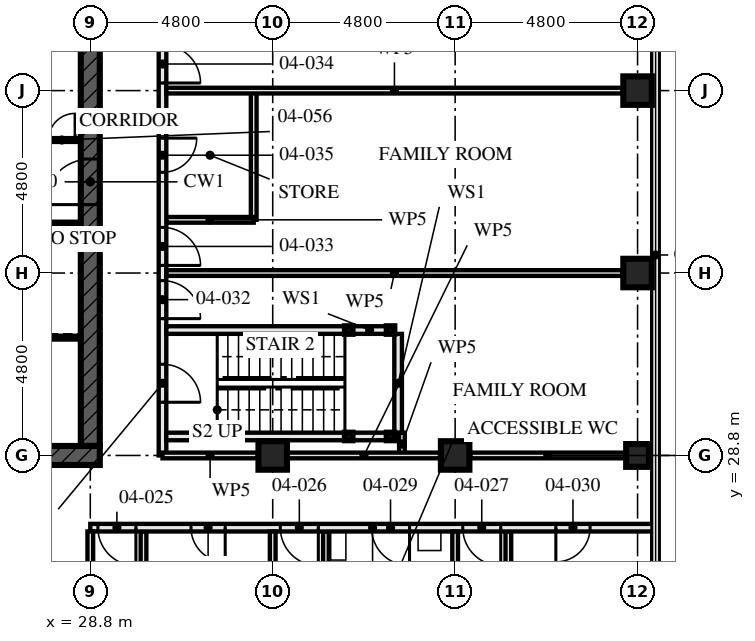
"""IFC4 building model, lengths in metres.
Left out: names, types, materials, properties, quantities, classifications, styles, units other than length and angle.
Written with IfcOpenShell. Run it as: python <this file> out.ifc"""

import sys

from ifc_helpers import new_model, si_unit, direction, frame, frame_2d, origin, origin_2d, place, context, subcontext, project, spatial, rectangle, hollow_rectangle, extrude, element, fill, save


model = new_model("IFC4")
c1 = context("Model", 3, precision=1e-05, world=origin(), true_north=direction((0.0, 1.0)))
c2 = subcontext(c1, "Body", "Model", "MODEL_VIEW")
j1 = project(units=[si_unit("LENGTHUNIT", "METRE"), si_unit("PLANEANGLEUNIT", "RADIAN")], contexts=[c1])
p1 = place(None, origin())
s1 = spatial("IfcSite", under=j1, at=p1, CompositionType="ELEMENT")
p2 = place(p1, origin())
s2 = spatial("IfcBuilding", under=s1, at=p2, CompositionType="ELEMENT")
p3 = place(p2, frame((0.0, 0.0, 18.0)))
s3 = spatial("IfcBuildingStorey", under=s2, at=p3, CompositionType="ELEMENT", Elevation=18.0)
for number, where, z_axis, x_axis in (
    (1, (33.6, 28.8, 0.0), (0.0, 0.0, 1.0), (0.0, 1.0, 0.0)),
    (2, (38.4, 28.8, 0.0), (0.0, 0.0, 1.0), (0.0, 1.0, 0.0)),
):
    element("IfcColumn", number, at=place(p3, frame(where, z_axis=z_axis, x_axis=x_axis)), inside=s3, PredefinedType="COLUMN", context=c2, shape_type="SweptSolid", body=[
        extrude(hollow_rectangle(XDim=0.75, YDim=0.75, WallThickness=0.08, at=origin_2d()), origin(), (0.0, 0.0, 1.0), 4.5),
    ])
p4 = place(p3, frame((43.2, 28.8, 0.0), z_axis=(0.0, 0.0, 1.0), x_axis=(0.0, 1.0, 0.0)))
e3 = element("IfcColumn", 3, at=p4, inside=s3, PredefinedType="COLUMN", context=c2, shape_type="SweptSolid", body=[
    extrude(hollow_rectangle(XDim=0.6, YDim=0.6, WallThickness=0.08, at=origin_2d()), origin(), (0.0, 0.0, 1.0), 4.5),
])
for number, where, z_axis, x_axis in (
    (4, (43.2, 33.6, 0.0), (0.0, 0.0, 1.0), (1.0, 0.0, 0.0)),
    (5, (43.2, 38.4, 0.0), (0.0, 0.0, 1.0), (1.0, 0.0, 0.0)),
):
    element("IfcColumn", number, at=place(p3, frame(where, z_axis=z_axis, x_axis=x_axis)), inside=s3, PredefinedType="COLUMN", context=c2, shape_type="SweptSolid", body=[
        extrude(hollow_rectangle(XDim=0.75, YDim=0.75, WallThickness=0.08, at=origin_2d()), origin(), (0.0, 0.0, 1.0), 4.5),
    ])
p5 = place(p3, frame((14.15, 28.8, -0.17), z_axis=(0.0, 0.0, 1.0), x_axis=(1.0, 0.0, 0.0)))
e6 = element("IfcWall", 6, at=p5, inside=s3, PredefinedType="SHEAR", context=c2, shape_type="SweptSolid", body=[
    extrude(rectangle(XDim=14.9, YDim=0.5, at=frame_2d((7.45, 0.0))), origin(), (0.0, 0.0, 1.0), 4.5),
])
p6 = place(p5, frame((6.85, 0.0, 0.17)))
e7 = element("IfcOpeningElement", 7, at=p6, cuts=e6, PredefinedType="OPENING", context=c2, shape_type="SweptSolid", body=[
    extrude(rectangle(XDim=1.2, YDim=2.1, at=frame_2d((0.6, 1.05))), frame((0.0, 0.26, 0.0), z_axis=(0.0, -1.0, 0.0), x_axis=(1.0, 0.0, 0.0)), (0.0, 0.0, 1.0), 0.521),
])
p7 = place(p3, frame((28.8, 29.05, -0.17), z_axis=(0.0, 0.0, 1.0), x_axis=(0.0, 1.0, 0.0)))
e8 = element("IfcWall", 8, at=p7, inside=s3, PredefinedType="SHEAR", context=c2, shape_type="SweptSolid", body=[
    extrude(rectangle(XDim=13.9, YDim=0.5, at=frame_2d((6.95, 0.0))), origin(), (0.0, 0.0, 1.0), 4.5),
])
p8 = place(p7, frame((6.35, 0.0, 0.17)))
e9 = element("IfcOpeningElement", 9, at=p8, cuts=e8, PredefinedType="OPENING", context=c2, shape_type="SweptSolid", body=[
    extrude(rectangle(XDim=1.2, YDim=2.1, at=frame_2d((0.6, 1.05))), frame((0.0, 0.26, 0.0), z_axis=(0.0, -1.0, 0.0), x_axis=(1.0, 0.0, 0.0)), (0.0, 0.0, 1.0), 0.521),
])
for number, where, z_axis, x_axis in (
    (10, (36.7, 29.3, 0.0), (0.0, 0.0, 1.0), (1.0, 0.0, 0.0)),
    (11, (36.7, 32.1, 0.0), (0.0, 0.0, 1.0), (1.0, 0.0, 0.0)),
    (12, (35.6, 29.3, 0.0), (0.0, 0.0, 1.0), (1.0, 0.0, 0.0)),
    (13, (35.6, 32.1, 0.0), (0.0, 0.0, 1.0), (1.0, 0.0, 0.0)),
):
    element("IfcColumn", number, at=place(p3, frame(where, z_axis=z_axis, x_axis=x_axis)), inside=s3, PredefinedType="COLUMN", context=c2, shape_type="SweptSolid", body=[
        extrude(hollow_rectangle(XDim=0.2, YDim=0.2, WallThickness=0.008, at=origin_2d()), origin(), (0.0, 0.0, 1.0), 4.33),
    ])
for number, where, z_axis, x_axis in (
    (14, (30.2, 23.8, 0.0), (0.0, 0.0, 1.0), (0.0, 1.0, 0.0)),
    (15, (35.0, 23.8, 0.0), (0.0, 0.0, 1.0), (0.0, 1.0, 0.0)),
    (16, (39.8, 23.8, 0.0), (0.0, 0.0, 1.0), (0.0, 1.0, 0.0)),
):
    element("IfcWall", number, at=place(p3, frame(where, z_axis=z_axis, x_axis=x_axis)), inside=s3, PredefinedType="PARTITIONING", context=c2, shape_type="SweptSolid", body=[
        extrude(rectangle(XDim=3.0, YDim=0.15, at=frame_2d((1.5, 0.0))), origin(), (0.0, 0.0, 1.0), 3.55),
    ])
p9 = place(p3, frame((33.6, 14.705, 0.0), z_axis=(0.0, 0.0, 1.0), x_axis=(0.0, 1.0, 0.0)))
e17 = element("IfcWall", 17, at=p9, inside=s3, PredefinedType="PARTITIONING", context=c2, shape_type="SweptSolid", body=[
    extrude(rectangle(XDim=12.095, YDim=0.15, at=frame_2d((6.048, 0.0))), origin(), (0.0, 0.0, 1.0), 3.55),
])
p10 = place(p3, frame((38.4, 19.504, 0.0), z_axis=(0.0, 0.0, 1.0), x_axis=(0.0, 1.0, 0.0)))
e18 = element("IfcWall", 18, at=p10, inside=s3, PredefinedType="PARTITIONING", context=c2, shape_type="SweptSolid", body=[
    extrude(rectangle(XDim=7.296, YDim=0.15, at=frame_2d((3.648, 0.0))), origin(), (0.0, 0.0, 1.0), 3.32),
])
p11 = place(p3, frame((28.8, 26.9, 0.0), z_axis=(0.0, 0.0, 1.0), x_axis=(1.0, 0.0, 0.0)))
e19 = element("IfcWall", 19, at=p11, inside=s3, PredefinedType="PARTITIONING", context=c2, shape_type="SweptSolid", body=[
    extrude(rectangle(XDim=14.855, YDim=0.2, at=frame_2d((7.427, 0.0))), origin(), (0.0, 0.0, 1.0), 3.32),
])
p12 = place(p11, frame((0.2, 0.0, 0.0)))
e20 = element("IfcOpeningElement", 20, at=p12, cuts=e19, PredefinedType="OPENING", context=c2, shape_type="SweptSolid", body=[
    extrude(rectangle(XDim=1.0, YDim=2.4, at=frame_2d((0.5, 1.2))), frame((0.0, 0.111, 0.0), z_axis=(0.0, -1.0, 0.0), x_axis=(1.0, 0.0, 0.0)), (0.0, 0.0, 1.0), 0.221),
])
p13 = place(p11, frame((5.0, 0.0, 0.0)))
e21 = element("IfcOpeningElement", 21, at=p13, cuts=e19, PredefinedType="OPENING", context=c2, shape_type="SweptSolid", body=[
    extrude(rectangle(XDim=1.0, YDim=2.4, at=frame_2d((0.5, 1.2))), frame((0.0, 0.111, 0.0), z_axis=(0.0, -1.0, 0.0), x_axis=(1.0, 0.0, 0.0)), (0.0, 0.0, 1.0), 0.221),
])
p14 = place(p11, frame((9.8, 0.0, 0.0)))
e22 = element("IfcOpeningElement", 22, at=p14, cuts=e19, PredefinedType="OPENING", context=c2, shape_type="SweptSolid", body=[
    extrude(rectangle(XDim=1.0, YDim=2.4, at=frame_2d((0.5, 1.2))), frame((0.0, 0.111, 0.0), z_axis=(0.0, -1.0, 0.0), x_axis=(1.0, 0.0, 0.0)), (0.0, 0.0, 1.0), 0.221),
])
p15 = place(p11, frame((2.65, 0.0, 0.0)))
e23 = element("IfcOpeningElement", 23, at=p15, cuts=e19, PredefinedType="OPENING", context=c2, shape_type="SweptSolid", body=[
    extrude(rectangle(XDim=0.9, YDim=2.1, at=frame_2d((0.45, 1.05))), frame((0.0, 0.111, 0.0), z_axis=(0.0, -1.0, 0.0), x_axis=(1.0, 0.0, 0.0)), (0.0, 0.0, 1.0), 0.221),
])
p16 = place(p11, frame((7.4, 0.0, 0.0)))
e24 = element("IfcOpeningElement", 24, at=p16, cuts=e19, PredefinedType="OPENING", context=c2, shape_type="SweptSolid", body=[
    extrude(rectangle(XDim=1.0, YDim=2.1, at=frame_2d((0.5, 1.05))), frame((0.0, 0.111, 0.0), z_axis=(0.0, -1.0, 0.0), x_axis=(1.0, 0.0, 0.0)), (0.0, 0.0, 1.0), 0.221),
])
p17 = place(p11, frame((12.25, 0.0, 0.0)))
e25 = element("IfcOpeningElement", 25, at=p17, cuts=e19, PredefinedType="OPENING", context=c2, shape_type="SweptSolid", body=[
    extrude(rectangle(XDim=0.9, YDim=2.1, at=frame_2d((0.45, 1.05))), frame((0.0, 0.111, 0.0), z_axis=(0.0, -1.0, 0.0), x_axis=(1.0, 0.0, 0.0)), (0.0, 0.0, 1.0), 0.221),
])
p18 = place(p3, frame((36.6, 29.3, 0.0), z_axis=(0.0, 0.0, 1.0), x_axis=(-1.0, 0.0, 0.0)))
e26 = element("IfcWall", 26, at=p18, inside=s3, PredefinedType="SOLIDWALL", context=c2, shape_type="SweptSolid", body=[
    extrude(rectangle(XDim=0.9, YDim=0.2, at=frame_2d((0.45, 0.0))), origin(), (0.0, 0.0, 1.0), 3.99),
])
p19 = place(p3, frame((35.5, 29.3, 0.0), z_axis=(0.0, 0.0, 1.0), x_axis=(-1.0, 0.0, 0.0)))
e27 = element("IfcWall", 27, at=p19, inside=s3, PredefinedType="SOLIDWALL", context=c2, shape_type="SweptSolid", body=[
    extrude(rectangle(XDim=4.7, YDim=0.2, at=frame_2d((2.35, 0.0))), origin(), (0.0, 0.0, 1.0), 3.99),
])
p20 = place(p3, frame((36.6, 32.1, 0.0), z_axis=(0.0, 0.0, 1.0), x_axis=(-1.0, 0.0, 0.0)))
e28 = element("IfcWall", 28, at=p20, inside=s3, PredefinedType="SOLIDWALL", context=c2, shape_type="SweptSolid", body=[
    extrude(rectangle(XDim=0.9, YDim=0.2, at=frame_2d((0.45, 0.0))), origin(), (0.0, 0.0, 1.0), 3.99),
])
p21 = place(p3, frame((35.5, 32.1, 0.0), z_axis=(0.0, 0.0, 1.0), x_axis=(-1.0, 0.0, 0.0)))
e29 = element("IfcWall", 29, at=p21, inside=s3, PredefinedType="SOLIDWALL", context=c2, shape_type="SweptSolid", body=[
    extrude(rectangle(XDim=4.7, YDim=0.2, at=frame_2d((2.35, 0.0))), origin(), (0.0, 0.0, 1.0), 3.99),
])
p22 = place(p3, frame((36.9, 29.4, 0.0), z_axis=(0.0, 0.0, 1.0), x_axis=(0.0, 1.0, 0.0)))
e30 = element("IfcWall", 30, at=p22, inside=s3, PredefinedType="SOLIDWALL", context=c2, shape_type="SweptSolid", body=[
    extrude(rectangle(XDim=2.6, YDim=0.2, at=frame_2d((1.3, 0.0))), origin(), (0.0, 0.0, 1.0), 4.33),
])
p23 = place(p3, frame((33.1, 35.0, 0.0), z_axis=(0.0, 0.0, 1.0), x_axis=(-1.0, 0.0, 0.0)))
e31 = element("IfcWall", 31, at=p23, inside=s3, PredefinedType="PARTITIONING", context=c2, shape_type="SweptSolid", body=[
    extrude(rectangle(XDim=2.3, YDim=0.15, at=frame_2d((1.15, 0.0))), origin(), (0.0, 0.0, 1.0), 4.33),
])
p24 = place(p3, frame((33.1, 35.0, 0.0), z_axis=(0.0, 0.0, 1.0), x_axis=(0.0, 1.0, 0.0)))
e32 = element("IfcWall", 32, at=p24, inside=s3, PredefinedType="PARTITIONING", context=c2, shape_type="SweptSolid", body=[
    extrude(rectangle(XDim=3.4, YDim=0.15, at=frame_2d((1.7, 0.0))), origin(), (0.0, 0.0, 1.0), 4.33),
])
for number, where, z_axis, x_axis in (
    (33, (42.805, 33.6, 0.0), (0.0, 0.0, 1.0), (-1.0, 0.0, 0.0)),
    (34, (42.805, 38.4, 0.0), (0.0, 0.0, 1.0), (-1.0, 0.0, 0.0)),
):
    element("IfcWall", number, at=place(p3, frame(where, z_axis=z_axis, x_axis=x_axis)), inside=s3, PredefinedType="PARTITIONING", context=c2, shape_type="SweptSolid", body=[
        extrude(rectangle(XDim=12.005, YDim=0.15, at=frame_2d((6.002, 0.0))), origin(), (0.0, 0.0, 1.0), 3.55),
    ])
p25 = place(p3, frame((37.0, 28.8, 0.0), z_axis=(0.0, 0.0, 1.0), x_axis=(0.0, 1.0, 0.0)))
e35 = element("IfcWall", 35, at=p25, inside=s3, PredefinedType="PARTITIONING", context=c2, shape_type="SweptSolid", body=[
    extrude(rectangle(XDim=0.6, YDim=0.15, at=frame_2d((0.3, 0.0))), origin(), (0.0, 0.0, 1.0), 4.33),
])
p26 = place(p3, frame((30.7, 28.8, 0.0), z_axis=(0.0, 0.0, 1.0), x_axis=(0.0, 1.0, 0.0)))
e36 = element("IfcWall", 36, at=p26, inside=s3, PredefinedType="PARTITIONING", context=c2, shape_type="SweptSolid", body=[
    extrude(rectangle(XDim=14.4, YDim=0.2, at=frame_2d((7.2, 0.0))), origin(), (0.0, 0.0, 1.0), 3.55),
])
p27 = place(p26, frame((1.4, 0.0, 0.0)))
e37 = element("IfcOpeningElement", 37, at=p27, cuts=e36, PredefinedType="OPENING", context=c2, shape_type="SweptSolid", body=[
    extrude(rectangle(XDim=1.0, YDim=2.1, at=frame_2d((0.5, 1.05))), frame((0.0, 0.111, 0.0), z_axis=(0.0, -1.0, 0.0), x_axis=(1.0, 0.0, 0.0)), (0.0, 0.0, 1.0), 0.221),
])
p28 = place(p26, frame((3.6, 0.0, 0.0)))
e38 = element("IfcOpeningElement", 38, at=p28, cuts=e36, PredefinedType="OPENING", context=c2, shape_type="SweptSolid", body=[
    extrude(rectangle(XDim=1.0, YDim=2.4, at=frame_2d((0.5, 1.2))), frame((0.0, 0.111, 0.0), z_axis=(0.0, -1.0, 0.0), x_axis=(1.0, 0.0, 0.0)), (0.0, 0.0, 1.0), 0.221),
])
p29 = place(p26, frame((5.0, 0.0, 0.0)))
e39 = element("IfcOpeningElement", 39, at=p29, cuts=e36, PredefinedType="OPENING", context=c2, shape_type="SweptSolid", body=[
    extrude(rectangle(XDim=1.0, YDim=2.4, at=frame_2d((0.5, 1.2))), frame((0.0, 0.111, 0.0), z_axis=(0.0, -1.0, 0.0), x_axis=(1.0, 0.0, 0.0)), (0.0, 0.0, 1.0), 0.221),
])
p30 = place(p26, frame((9.8, 0.0, 0.0)))
e40 = element("IfcOpeningElement", 40, at=p30, cuts=e36, PredefinedType="OPENING", context=c2, shape_type="SweptSolid", body=[
    extrude(rectangle(XDim=1.0, YDim=2.4, at=frame_2d((0.5, 1.2))), frame((0.0, 0.111, 0.0), z_axis=(0.0, -1.0, 0.0), x_axis=(1.0, 0.0, 0.0)), (0.0, 0.0, 1.0), 0.221),
])
p31 = place(p26, frame((7.45, 0.0, 0.0)))
e41 = element("IfcOpeningElement", 41, at=p31, cuts=e36, PredefinedType="OPENING", context=c2, shape_type="SweptSolid", body=[
    extrude(rectangle(XDim=0.9, YDim=2.1, at=frame_2d((0.45, 1.05))), frame((0.0, 0.111, 0.0), z_axis=(0.0, -1.0, 0.0), x_axis=(1.0, 0.0, 0.0)), (0.0, 0.0, 1.0), 0.221),
])
p32 = place(p26, frame((12.2, 0.0, 0.0)))
e42 = element("IfcOpeningElement", 42, at=p32, cuts=e36, PredefinedType="OPENING", context=c2, shape_type="SweptSolid", body=[
    extrude(rectangle(XDim=1.0, YDim=2.1, at=frame_2d((0.5, 1.05))), frame((0.0, 0.111, 0.0), z_axis=(0.0, -1.0, 0.0), x_axis=(1.0, 0.0, 0.0)), (0.0, 0.0, 1.0), 0.221),
])
p33 = place(p3, frame((23.05, 34.9, 0.0), z_axis=(0.0, 0.0, 1.0), x_axis=(1.0, 0.0, 0.0)))
e43 = element("IfcWall", 43, at=p33, inside=s3, PredefinedType="SOLIDWALL", context=c2, shape_type="SweptSolid", body=[
    extrude(rectangle(XDim=5.5, YDim=0.1, at=frame_2d((2.75, 0.0))), origin(), (0.0, 0.0, 1.0), 4.33),
])
p34 = place(p3, frame((22.65, 37.1, 0.0), z_axis=(0.0, 0.0, 1.0), x_axis=(1.0, 0.0, 0.0)))
e44 = element("IfcWall", 44, at=p34, inside=s3, PredefinedType="SOLIDWALL", context=c2, shape_type="SweptSolid", body=[
    extrude(rectangle(XDim=5.9, YDim=0.1, at=frame_2d((2.95, 0.0))), origin(), (0.0, 0.0, 1.0), 4.33),
])
p35 = place(p34, frame((3.5, 0.0, 0.0)))
e45 = element("IfcOpeningElement", 45, at=p35, cuts=e44, PredefinedType="OPENING", context=c2, shape_type="SweptSolid", body=[
    extrude(rectangle(XDim=0.9, YDim=2.1, at=frame_2d((0.45, 1.05))), frame((0.0, 0.061, 0.0), z_axis=(0.0, -1.0, 0.0), x_axis=(1.0, 0.0, 0.0)), (0.0, 0.0, 1.0), 0.121),
])
p36 = place(p34, frame((5.05, 0.0, 0.0)))
e46 = element("IfcOpeningElement", 46, at=p36, cuts=e44, PredefinedType="OPENING", context=c2, shape_type="SweptSolid", body=[
    extrude(rectangle(XDim=0.7, YDim=2.1, at=frame_2d((0.35, 1.05))), frame((0.0, 0.061, 0.0), z_axis=(0.0, -1.0, 0.0), x_axis=(1.0, 0.0, 0.0)), (0.0, 0.0, 1.0), 0.121),
])
p37 = place(p3, frame((23.15, 31.9, 0.0), z_axis=(0.0, 0.0, 1.0), x_axis=(1.0, 0.0, 0.0)))
e47 = element("IfcWall", 47, at=p37, inside=s3, PredefinedType="SOLIDWALL", context=c2, shape_type="SweptSolid", body=[
    extrude(rectangle(XDim=5.4, YDim=0.1, at=frame_2d((2.7, 0.0))), origin(), (0.0, 0.0, 1.0), 4.33),
])
p38 = place(p3, frame((28.8, 24.395, 0.0), z_axis=(0.0, 0.0, 1.0), x_axis=(0.0, 1.0, 0.0)))
e48 = element("IfcWall", 48, at=p38, inside=s3, PredefinedType="PARTITIONING", context=c2, shape_type="SweptSolid", body=[
    extrude(rectangle(XDim=2.405, YDim=0.15, at=frame_2d((1.203, 0.0))), origin(), (0.0, 0.0, 1.0), 3.32),
])
p39 = place(p3, frame((42.88, 28.8, 0.0), z_axis=(0.0, 0.0, 1.0), x_axis=(-1.0, 0.0, 0.0)))
e49 = element("IfcWall", 49, at=p39, inside=s3, PredefinedType="PARTITIONING", context=c2, shape_type="SweptSolid", body=[
    extrude(rectangle(XDim=4.085, YDim=0.15, at=frame_2d((2.042, 0.0))), origin(), (0.0, 0.0, 1.0), 3.32),
])
p40 = place(p3, frame((38.005, 28.8, 0.0), z_axis=(0.0, 0.0, 1.0), x_axis=(-1.0, 0.0, 0.0)))
e50 = element("IfcWall", 50, at=p40, inside=s3, PredefinedType="PARTITIONING", context=c2, shape_type="SweptSolid", body=[
    extrude(rectangle(XDim=4.01, YDim=0.15, at=frame_2d((2.005, 0.0))), origin(), (0.0, 0.0, 1.0), 3.32),
])
p41 = place(p3, frame((33.205, 28.8, 0.0), z_axis=(0.0, 0.0, 1.0), x_axis=(-1.0, 0.0, 0.0)))
e51 = element("IfcWall", 51, at=p41, inside=s3, PredefinedType="PARTITIONING", context=c2, shape_type="SweptSolid", body=[
    extrude(rectangle(XDim=2.505, YDim=0.15, at=frame_2d((1.252, 0.0))), origin(), (0.0, 0.0, 1.0), 3.32),
])
p42 = place(p12, frame((1.0, 0.0, 0.0), z_axis=(0.0, 0.0, 1.0), x_axis=(-1.0, 0.0, 0.0)))
e52 = element("IfcDoor", 52, at=p42, inside=s3, OperationType="SINGLE_SWING_RIGHT", PredefinedType="DOOR", context=c2, shape_type="SweptSolid", body=[
    extrude(rectangle(XDim=1.0, YDim=2.4, at=frame_2d((0.5, 1.2))), frame((0.0, 0.027, 0.0), z_axis=(0.0, -1.0, 0.0), x_axis=(1.0, 0.0, 0.0)), (0.0, 0.0, 1.0), 0.054),
])
fill(e20, e52)
p43 = place(p13, frame((1.0, 0.0, 0.0), z_axis=(0.0, 0.0, 1.0), x_axis=(-1.0, 0.0, 0.0)))
e53 = element("IfcDoor", 53, at=p43, inside=s3, OperationType="SINGLE_SWING_RIGHT", PredefinedType="DOOR", context=c2, shape_type="SweptSolid", body=[
    extrude(rectangle(XDim=1.0, YDim=2.4, at=frame_2d((0.5, 1.2))), frame((0.0, 0.027, 0.0), z_axis=(0.0, -1.0, 0.0), x_axis=(1.0, 0.0, 0.0)), (0.0, 0.0, 1.0), 0.054),
])
fill(e21, e53)
p44 = place(p14, frame((1.0, 0.0, 0.0), z_axis=(0.0, 0.0, 1.0), x_axis=(-1.0, 0.0, 0.0)))
e54 = element("IfcDoor", 54, at=p44, inside=s3, OperationType="SINGLE_SWING_RIGHT", PredefinedType="DOOR", context=c2, shape_type="SweptSolid", body=[
    extrude(rectangle(XDim=1.0, YDim=2.4, at=frame_2d((0.5, 1.2))), frame((0.0, 0.027, 0.0), z_axis=(0.0, -1.0, 0.0), x_axis=(1.0, 0.0, 0.0)), (0.0, 0.0, 1.0), 0.054),
])
fill(e22, e54)
p45 = place(p15, frame((0.9, 0.0, 0.0), z_axis=(0.0, 0.0, 1.0), x_axis=(-1.0, 0.0, 0.0)))
e55 = element("IfcDoor", 55, at=p45, inside=s3, OperationType="SINGLE_SWING_RIGHT", PredefinedType="DOOR", context=c2, shape_type="SweptSolid", body=[
    extrude(rectangle(XDim=0.9, YDim=2.1, at=frame_2d((0.45, 1.05))), frame((0.0, 0.027, 0.0), z_axis=(0.0, -1.0, 0.0), x_axis=(1.0, 0.0, 0.0)), (0.0, 0.0, 1.0), 0.054),
])
fill(e23, e55)
p46 = place(p16, frame((1.0, 0.0, 0.0), z_axis=(0.0, 0.0, 1.0), x_axis=(-1.0, 0.0, 0.0)))
e56 = element("IfcDoor", 56, at=p46, inside=s3, OperationType="SINGLE_SWING_RIGHT", PredefinedType="DOOR", context=c2, shape_type="SweptSolid", body=[
    extrude(rectangle(XDim=1.0, YDim=2.1, at=frame_2d((0.5, 1.05))), frame((0.0, 0.027, 0.0), z_axis=(0.0, -1.0, 0.0), x_axis=(1.0, 0.0, 0.0)), (0.0, 0.0, 1.0), 0.054),
])
fill(e24, e56)
p47 = place(p17, frame((0.9, 0.0, 0.0), z_axis=(0.0, 0.0, 1.0), x_axis=(-1.0, 0.0, 0.0)))
e57 = element("IfcDoor", 57, at=p47, inside=s3, OperationType="SINGLE_SWING_LEFT", PredefinedType="DOOR", context=c2, shape_type="SweptSolid", body=[
    extrude(rectangle(XDim=0.9, YDim=2.1, at=frame_2d((0.45, 1.05))), frame((0.0, 0.027, 0.0), z_axis=(0.0, -1.0, 0.0), x_axis=(1.0, 0.0, 0.0)), (0.0, 0.0, 1.0), 0.054),
])
fill(e25, e57)
p48 = place(p27, frame((1.0, 0.0, 0.0), z_axis=(0.0, 0.0, 1.0), x_axis=(-1.0, 0.0, 0.0)))
e58 = element("IfcDoor", 58, at=p48, inside=s3, OperationType="SINGLE_SWING_LEFT", PredefinedType="DOOR", context=c2, shape_type="SweptSolid", body=[
    extrude(rectangle(XDim=1.0, YDim=2.1, at=frame_2d((0.5, 1.05))), frame((0.0, 0.032, 0.0), z_axis=(0.0, -1.0, 0.0), x_axis=(1.0, 0.0, 0.0)), (0.0, 0.0, 1.0), 0.064),
])
fill(e37, e58)
p49 = place(p28, frame((1.0, 0.0, 0.0), z_axis=(0.0, 0.0, 1.0), x_axis=(-1.0, 0.0, 0.0)))
e59 = element("IfcDoor", 59, at=p49, inside=s3, OperationType="SINGLE_SWING_LEFT", PredefinedType="DOOR", context=c2, shape_type="SweptSolid", body=[
    extrude(rectangle(XDim=1.0, YDim=2.4, at=frame_2d((0.5, 1.2))), frame((0.0, 0.027, 0.0), z_axis=(0.0, -1.0, 0.0), x_axis=(1.0, 0.0, 0.0)), (0.0, 0.0, 1.0), 0.054),
])
fill(e38, e59)
p50 = place(p29, frame((1.0, 0.0, 0.0), z_axis=(0.0, 0.0, 1.0), x_axis=(-1.0, 0.0, 0.0)))
e60 = element("IfcDoor", 60, at=p50, inside=s3, OperationType="SINGLE_SWING_LEFT", PredefinedType="DOOR", context=c2, shape_type="SweptSolid", body=[
    extrude(rectangle(XDim=1.0, YDim=2.4, at=frame_2d((0.5, 1.2))), frame((0.0, 0.027, 0.0), z_axis=(0.0, -1.0, 0.0), x_axis=(1.0, 0.0, 0.0)), (0.0, 0.0, 1.0), 0.054),
])
fill(e39, e60)
p51 = place(p30, frame((1.0, 0.0, 0.0), z_axis=(0.0, 0.0, 1.0), x_axis=(-1.0, 0.0, 0.0)))
e61 = element("IfcDoor", 61, at=p51, inside=s3, OperationType="SINGLE_SWING_LEFT", PredefinedType="DOOR", context=c2, shape_type="SweptSolid", body=[
    extrude(rectangle(XDim=1.0, YDim=2.4, at=frame_2d((0.5, 1.2))), frame((0.0, 0.027, 0.0), z_axis=(0.0, -1.0, 0.0), x_axis=(1.0, 0.0, 0.0)), (0.0, 0.0, 1.0), 0.054),
])
fill(e40, e61)
p52 = place(p31, frame((0.9, 0.0, 0.0), z_axis=(0.0, 0.0, 1.0), x_axis=(-1.0, 0.0, 0.0)))
e62 = element("IfcDoor", 62, at=p52, inside=s3, OperationType="SINGLE_SWING_RIGHT", PredefinedType="DOOR", context=c2, shape_type="SweptSolid", body=[
    extrude(rectangle(XDim=0.9, YDim=2.1, at=frame_2d((0.45, 1.05))), frame((0.0, 0.027, 0.0), z_axis=(0.0, -1.0, 0.0), x_axis=(1.0, 0.0, 0.0)), (0.0, 0.0, 1.0), 0.054),
])
fill(e41, e62)
p53 = place(p36, origin())
e63 = element("IfcDoor", 63, at=p53, inside=s3, OperationType="SINGLE_SWING_LEFT", PredefinedType="DOOR", context=c2, shape_type="SweptSolid", body=[
    extrude(rectangle(XDim=0.7, YDim=2.1, at=frame_2d((0.35, 1.05))), frame((0.0, 0.027, 0.0), z_axis=(0.0, -1.0, 0.0), x_axis=(1.0, 0.0, 0.0)), (0.0, 0.0, 1.0), 0.054),
])
fill(e46, e63)
p54 = place(p8, origin())
e64 = element("IfcDoor", 64, at=p54, inside=s3, OperationType="SINGLE_SWING_LEFT", PredefinedType="DOOR", context=c2, shape_type="SweptSolid", body=[
    extrude(rectangle(XDim=1.2, YDim=2.1, at=frame_2d((0.6, 1.05))), frame((0.0, 0.027, 0.0), z_axis=(0.0, -1.0, 0.0), x_axis=(1.0, 0.0, 0.0)), (0.0, 0.0, 1.0), 0.054),
])
fill(e9, e64)
save(model, sys.argv[1])
